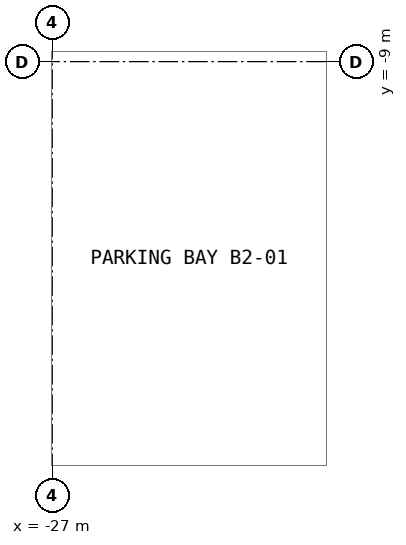
"""IFC4 building model, lengths in metres.
Left out: names, types, materials, properties, quantities, classifications, styles, units other than length and angle.
Written with IfcOpenShell. Run it as: python <this file> out.ifc"""

import sys

from ifc_helpers import new_model, si_unit, direction, frame, frame_2d, origin, place, context, subcontext, project, spatial, rectangle, extrude, element, save


model = new_model("IFC4")
c1 = context("Model", 3, precision=1e-05, world=origin(), true_north=direction((0.0, 1.0)))
c2 = subcontext(c1, "Body", "Model", "MODEL_VIEW")
j1 = project(units=[si_unit("LENGTHUNIT", "METRE"), si_unit("PLANEANGLEUNIT", "RADIAN")], contexts=[c1])
p1 = place(None, origin())
s1 = spatial("IfcSite", under=j1, at=p1, CompositionType="ELEMENT")
p2 = place(p1, origin())
s2 = spatial("IfcBuilding", under=s1, at=p2, CompositionType="ELEMENT")
p3 = place(p2, frame((0.0, 0.0, -8.4)))
s3 = spatial("IfcBuildingStorey", under=s2, at=p3, CompositionType="ELEMENT", Elevation=-8.4)
p4 = place(p3, frame((-6.74, 32.759, 0.0), z_axis=(0.0, 0.0, 1.0), x_axis=(-0.500000005698, -0.866025400495, 0.0)))
e1 = element("IfcWall", 1, at=p4, inside=s3, PredefinedType="SOLIDWALL", context=c2, shape_type="SweptSolid", body=[
    extrude(rectangle(XDim=50.0, YDim=0.6, at=frame_2d((25.0, 0.0))), origin(), (0.0, 0.0, 1.0), 3.75),
])
p5 = place(p3, frame((-31.74, -10.242, 0.0), z_axis=(0.0, 0.0, 1.0), x_axis=(0.499995173006, -0.866028190633, 0.0)))
e2 = element("IfcWall", 2, at=p5, inside=s3, PredefinedType="SOLIDWALL", context=c2, shape_type="SweptSolid", body=[
    extrude(rectangle(XDim=14.0, YDim=0.6, at=frame_2d((7.0, 0.0))), origin(), (0.0, 0.0, 1.0), 3.75),
])
save(model, sys.argv[1])
